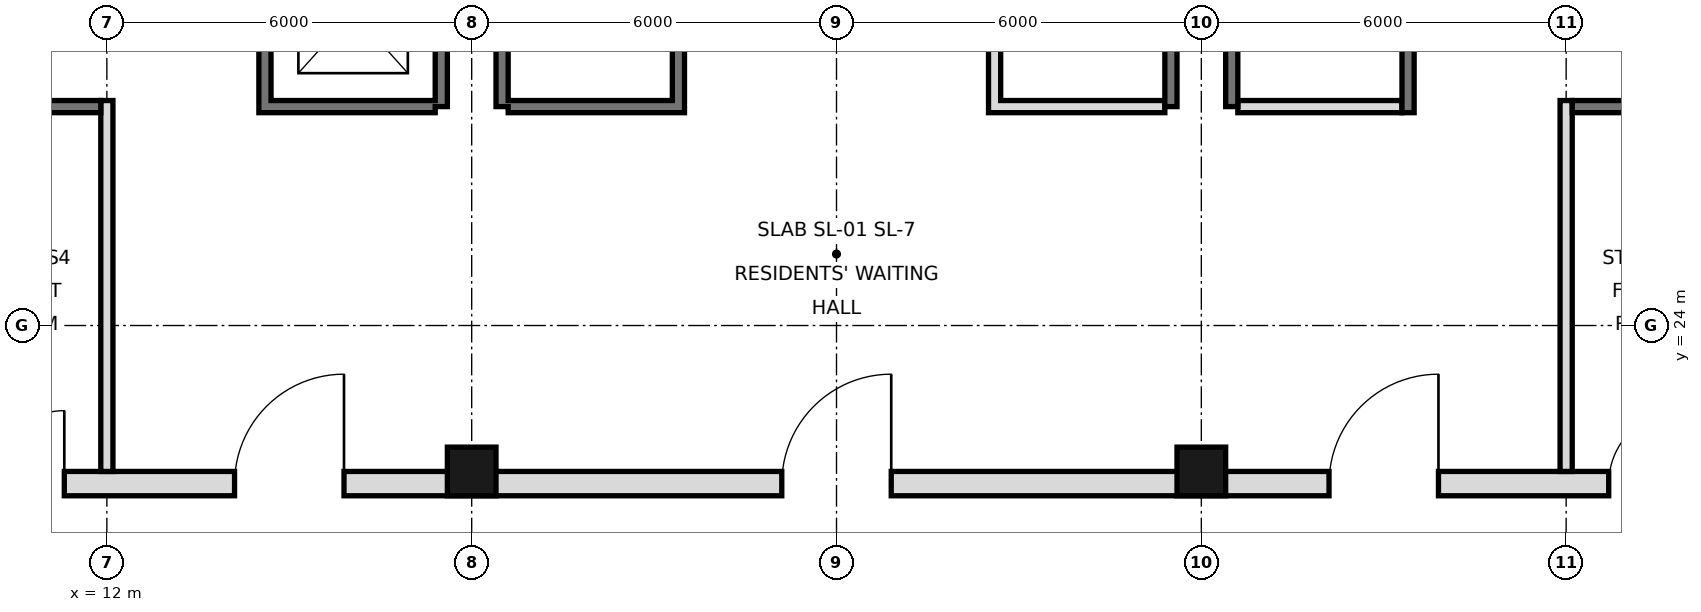
"""IFC4 building model, lengths in metres.
Left out: names, types, materials, properties, quantities, classifications, styles, units other than length and angle.
Written with IfcOpenShell. Run it as: python <this file> out.ifc"""

import sys

from ifc_helpers import new_model, si_unit, direction, frame, frame_2d, origin, origin_2d, place, context, subcontext, project, spatial, rectangle, hollow_rectangle, extrude, element, fill, save


model = new_model("IFC4")
c1 = context("Model", 3, precision=1e-05, world=origin(), true_north=direction((0.0, 1.0)))
c2 = subcontext(c1, "Body", "Model", "MODEL_VIEW")
j1 = project(units=[si_unit("LENGTHUNIT", "METRE"), si_unit("PLANEANGLEUNIT", "RADIAN")], contexts=[c1])
p1 = place(None, origin())
s1 = spatial("IfcSite", under=j1, at=p1, CompositionType="ELEMENT")
p2 = place(p1, origin())
s2 = spatial("IfcBuilding", under=s1, at=p2, CompositionType="ELEMENT")
p3 = place(p2, frame((0.0, 0.0, 49.8)))
s3 = spatial("IfcBuildingStorey", under=s2, at=p3, CompositionType="ELEMENT", Elevation=49.8)
for number, where, z_axis, x_axis in (
    (1, (18.0, 21.6, 0.0), (0.0, 0.0, 1.0), (1.0, 0.0, 0.0)),
    (2, (30.0, 21.6, 0.0), (0.0, 0.0, 1.0), (1.0, 0.0, 0.0)),
):
    element("IfcColumn", number, at=place(p3, frame(where, z_axis=z_axis, x_axis=x_axis)), inside=s3, PredefinedType="COLUMN", context=c2, shape_type="SweptSolid", body=[
        extrude(hollow_rectangle(XDim=0.8, YDim=0.8, WallThickness=0.06, at=origin_2d()), origin(), (0.0, 0.0, 1.0), 3.6),
    ])
for number, where, z_axis, x_axis in (
    (3, (17.5, 27.6, 0.0), (0.0, 0.0, 1.0), (0.0, 1.0, 0.0)),
    (4, (18.5, 27.6, 0.0), (0.0, 0.0, 1.0), (0.0, 1.0, 0.0)),
    (5, (29.5, 27.6, 0.0), (0.0, 0.0, 1.0), (0.0, 1.0, 0.0)),
    (6, (30.5, 27.6, 0.0), (0.0, 0.0, 1.0), (0.0, 1.0, 0.0)),
):
    element("IfcWall", number, at=place(p3, frame(where, z_axis=z_axis, x_axis=x_axis)), inside=s3, PredefinedType="SOLIDWALL", context=c2, shape_type="SweptSolid", body=[
        extrude(rectangle(XDim=17.5, YDim=0.2, at=frame_2d((8.75, 0.0))), origin(), (0.0, 0.0, 1.0), 3.42),
    ])
p4 = place(p3, frame((5.6, 21.4, 0.0), z_axis=(0.0, 0.0, 1.0), x_axis=(1.0, 0.0, 0.0)))
e7 = element("IfcWall", 7, at=p4, inside=s3, PredefinedType="SOLIDWALL", context=c2, shape_type="SweptSolid", body=[
    extrude(rectangle(XDim=36.8, YDim=0.4, at=frame_2d((18.4, 0.0))), origin(), (0.0, 0.0, 1.0), 3.42),
])
p5 = place(p4, frame((8.5, 0.0, 0.0)))
e8 = element("IfcOpeningElement", 8, at=p5, cuts=e7, PredefinedType="OPENING", context=c2, shape_type="SweptSolid", body=[
    extrude(rectangle(XDim=1.8, YDim=2.1, at=frame_2d((0.9, 1.05))), frame((0.0, 0.21, 0.0), z_axis=(0.0, -1.0, 0.0), x_axis=(1.0, 0.0, 0.0)), (0.0, 0.0, 1.0), 0.42),
])
p6 = place(p4, frame((17.5, 0.0, 0.0)))
e9 = element("IfcOpeningElement", 9, at=p6, cuts=e7, PredefinedType="OPENING", context=c2, shape_type="SweptSolid", body=[
    extrude(rectangle(XDim=1.8, YDim=2.1, at=frame_2d((0.9, 1.05))), frame((0.0, 0.21, 0.0), z_axis=(0.0, -1.0, 0.0), x_axis=(1.0, 0.0, 0.0)), (0.0, 0.0, 1.0), 0.42),
])
p7 = place(p4, frame((26.5, 0.0, 0.0)))
e10 = element("IfcOpeningElement", 10, at=p7, cuts=e7, PredefinedType="OPENING", context=c2, shape_type="SweptSolid", body=[
    extrude(rectangle(XDim=1.8, YDim=2.1, at=frame_2d((0.9, 1.05))), frame((0.0, 0.21, 0.0), z_axis=(0.0, -1.0, 0.0), x_axis=(1.0, 0.0, 0.0)), (0.0, 0.0, 1.0), 0.42),
])
p8 = place(p4, frame((4.5, 0.0, 0.0)))
e11 = element("IfcOpeningElement", 11, at=p8, cuts=e7, PredefinedType="OPENING", context=c2, shape_type="SweptSolid", body=[
    extrude(rectangle(XDim=1.2, YDim=2.1, at=frame_2d((0.6, 1.05))), frame((0.0, 0.21, 0.0), z_axis=(0.0, -1.0, 0.0), x_axis=(1.0, 0.0, 0.0)), (0.0, 0.0, 1.0), 0.42),
])
p9 = place(p4, frame((31.1, 0.0, 0.0)))
e12 = element("IfcOpeningElement", 12, at=p9, cuts=e7, PredefinedType="OPENING", context=c2, shape_type="SweptSolid", body=[
    extrude(rectangle(XDim=1.2, YDim=2.1, at=frame_2d((0.6, 1.05))), frame((0.0, 0.21, 0.0), z_axis=(0.0, -1.0, 0.0), x_axis=(1.0, 0.0, 0.0)), (0.0, 0.0, 1.0), 0.42),
])
p10 = place(p3, frame((12.0, 21.6, 0.0), z_axis=(0.0, 0.0, 1.0), x_axis=(0.0, 1.0, 0.0)))
e13 = element("IfcWall", 13, at=p10, inside=s3, PredefinedType="PARTITIONING", context=c2, shape_type="SweptSolid", body=[
    extrude(rectangle(XDim=6.1, YDim=0.2, at=frame_2d((3.05, 0.0))), origin(), (0.0, 0.0, 1.0), 3.42),
])
p11 = place(p3, frame((14.6, 27.5, 0.0), z_axis=(0.0, 0.0, 1.0), x_axis=(0.0, 1.0, 0.0)))
e14 = element("IfcWall", 14, at=p11, inside=s3, PredefinedType="SOLIDWALL", context=c2, shape_type="SweptSolid", body=[
    extrude(rectangle(XDim=17.5, YDim=0.2, at=frame_2d((8.75, 0.0))), origin(), (0.0, 0.0, 1.0), 3.42),
])
p12 = place(p11, frame((1.1, 0.0, 0.0)))
e15 = element("IfcOpeningElement", 15, at=p12, cuts=e14, PredefinedType="OPENING", context=c2, shape_type="SweptSolid", body=[
    extrude(rectangle(XDim=1.1, YDim=2.1, at=frame_2d((0.55, 1.05))), frame((0.0, 0.11, 0.0), z_axis=(0.0, -1.0, 0.0), x_axis=(1.0, 0.0, 0.0)), (0.0, 0.0, 1.0), 0.22),
])
p13 = place(p11, frame((4.2, 0.0, 0.0)))
e16 = element("IfcOpeningElement", 16, at=p13, cuts=e14, PredefinedType="OPENING", context=c2, shape_type="SweptSolid", body=[
    extrude(rectangle(XDim=1.1, YDim=2.1, at=frame_2d((0.55, 1.05))), frame((0.0, 0.11, 0.0), z_axis=(0.0, -1.0, 0.0), x_axis=(1.0, 0.0, 0.0)), (0.0, 0.0, 1.0), 0.22),
])
p14 = place(p11, frame((15.4, 0.0, 0.0)))
e17 = element("IfcOpeningElement", 17, at=p14, cuts=e14, PredefinedType="OPENING", context=c2, shape_type="SweptSolid", body=[
    extrude(rectangle(XDim=1.1, YDim=2.1, at=frame_2d((0.55, 1.05))), frame((0.0, 0.11, 0.0), z_axis=(0.0, -1.0, 0.0), x_axis=(1.0, 0.0, 0.0)), (0.0, 0.0, 1.0), 0.22),
])
p15 = place(p11, frame((9.9, 0.0, 0.0)))
e18 = element("IfcOpeningElement", 18, at=p15, cuts=e14, PredefinedType="OPENING", context=c2, shape_type="SweptSolid", body=[
    extrude(rectangle(XDim=0.9, YDim=2.1, at=frame_2d((0.45, 1.05))), frame((0.0, 0.11, 0.0), z_axis=(0.0, -1.0, 0.0), x_axis=(1.0, 0.0, 0.0)), (0.0, 0.0, 1.0), 0.22),
])
p16 = place(p3, frame((21.4, 27.5, 0.0), z_axis=(0.0, 0.0, 1.0), x_axis=(0.0, 1.0, 0.0)))
e19 = element("IfcWall", 19, at=p16, inside=s3, PredefinedType="SOLIDWALL", context=c2, shape_type="SweptSolid", body=[
    extrude(rectangle(XDim=17.5, YDim=0.2, at=frame_2d((8.75, 0.0))), origin(), (0.0, 0.0, 1.0), 3.42),
])
p17 = place(p16, frame((9.8, 0.0, 0.0)))
e20 = element("IfcOpeningElement", 20, at=p17, cuts=e19, PredefinedType="OPENING", context=c2, shape_type="SweptSolid", body=[
    extrude(rectangle(XDim=1.0, YDim=2.1, at=frame_2d((0.5, 1.05))), frame((0.0, 0.11, 0.0), z_axis=(0.0, -1.0, 0.0), x_axis=(1.0, 0.0, 0.0)), (0.0, 0.0, 1.0), 0.22),
])
p18 = place(p16, frame((7.4, 0.0, 0.0)))
e21 = element("IfcOpeningElement", 21, at=p18, cuts=e19, PredefinedType="OPENING", context=c2, shape_type="SweptSolid", body=[
    extrude(rectangle(XDim=0.9, YDim=2.1, at=frame_2d((0.45, 1.05))), frame((0.0, 0.11, 0.0), z_axis=(0.0, -1.0, 0.0), x_axis=(1.0, 0.0, 0.0)), (0.0, 0.0, 1.0), 0.22),
])
p19 = place(p3, frame((26.6, 27.5, 0.0), z_axis=(0.0, 0.0, 1.0), x_axis=(0.0, 1.0, 0.0)))
e22 = element("IfcWall", 22, at=p19, inside=s3, PredefinedType="SOLIDWALL", context=c2, shape_type="SweptSolid", body=[
    extrude(rectangle(XDim=17.5, YDim=0.2, at=frame_2d((8.75, 0.0))), origin(), (0.0, 0.0, 1.0), 3.42),
])
p20 = place(p19, frame((4.3, 0.0, 0.0)))
e23 = element("IfcOpeningElement", 23, at=p20, cuts=e22, PredefinedType="OPENING", context=c2, shape_type="SweptSolid", body=[
    extrude(rectangle(XDim=0.9, YDim=2.1, at=frame_2d((0.45, 1.05))), frame((0.0, 0.11, 0.0), z_axis=(0.0, -1.0, 0.0), x_axis=(1.0, 0.0, 0.0)), (0.0, 0.0, 1.0), 0.22),
])
p21 = place(p19, frame((10.35, 0.0, 0.0)))
e24 = element("IfcOpeningElement", 24, at=p21, cuts=e22, PredefinedType="OPENING", context=c2, shape_type="SweptSolid", body=[
    extrude(rectangle(XDim=1.0, YDim=2.1, at=frame_2d((0.5, 1.05))), frame((0.0, 0.11, 0.0), z_axis=(0.0, -1.0, 0.0), x_axis=(1.0, 0.0, 0.0)), (0.0, 0.0, 1.0), 0.22),
])
p22 = place(p19, frame((14.575, 0.0, 0.0)))
e25 = element("IfcOpeningElement", 25, at=p22, cuts=e22, PredefinedType="OPENING", context=c2, shape_type="SweptSolid", body=[
    extrude(rectangle(XDim=1.0, YDim=2.1, at=frame_2d((0.5, 1.05))), frame((0.0, 0.11, 0.0), z_axis=(0.0, -1.0, 0.0), x_axis=(1.0, 0.0, 0.0)), (0.0, 0.0, 1.0), 0.22),
])
p23 = place(p3, frame((33.4, 27.5, 0.0), z_axis=(0.0, 0.0, 1.0), x_axis=(0.0, 1.0, 0.0)))
e26 = element("IfcWall", 26, at=p23, inside=s3, PredefinedType="SOLIDWALL", context=c2, shape_type="SweptSolid", body=[
    extrude(rectangle(XDim=17.5, YDim=0.2, at=frame_2d((8.75, 0.0))), origin(), (0.0, 0.0, 1.0), 3.42),
])
p24 = place(p23, frame((15.4, 0.0, 0.0)))
e27 = element("IfcOpeningElement", 27, at=p24, cuts=e26, PredefinedType="OPENING", context=c2, shape_type="SweptSolid", body=[
    extrude(rectangle(XDim=1.1, YDim=2.1, at=frame_2d((0.55, 1.05))), frame((0.0, 0.11, 0.0), z_axis=(0.0, -1.0, 0.0), x_axis=(1.0, 0.0, 0.0)), (0.0, 0.0, 1.0), 0.22),
])
p25 = place(p23, frame((2.7, 0.0, 0.0)))
e28 = element("IfcOpeningElement", 28, at=p25, cuts=e26, PredefinedType="OPENING", context=c2, shape_type="SweptSolid", body=[
    extrude(rectangle(XDim=1.0, YDim=2.1, at=frame_2d((0.5, 1.05))), frame((0.0, 0.11, 0.0), z_axis=(0.0, -1.0, 0.0), x_axis=(1.0, 0.0, 0.0)), (0.0, 0.0, 1.0), 0.22),
])
p26 = place(p23, frame((9.9, 0.0, 0.0)))
e29 = element("IfcOpeningElement", 29, at=p26, cuts=e26, PredefinedType="OPENING", context=c2, shape_type="SweptSolid", body=[
    extrude(rectangle(XDim=0.9, YDim=2.1, at=frame_2d((0.45, 1.05))), frame((0.0, 0.11, 0.0), z_axis=(0.0, -1.0, 0.0), x_axis=(1.0, 0.0, 0.0)), (0.0, 0.0, 1.0), 0.22),
])
p27 = place(p3, frame((36.0, 21.6, 0.0), z_axis=(0.0, 0.0, 1.0), x_axis=(0.0, 1.0, 0.0)))
e30 = element("IfcWall", 30, at=p27, inside=s3, PredefinedType="PARTITIONING", context=c2, shape_type="SweptSolid", body=[
    extrude(rectangle(XDim=6.1, YDim=0.2, at=frame_2d((3.05, 0.0))), origin(), (0.0, 0.0, 1.0), 3.42),
])
for number, where, z_axis, x_axis in (
    (31, (14.7, 27.6, 0.0), (0.0, 0.0, 1.0), (1.0, 0.0, 0.0)),
    (32, (18.6, 27.6, 0.0), (0.0, 0.0, 1.0), (1.0, 0.0, 0.0)),
    (33, (26.7, 27.6, 0.0), (0.0, 0.0, 1.0), (1.0, 0.0, 0.0)),
):
    element("IfcWall", number, at=place(p3, frame(where, z_axis=z_axis, x_axis=x_axis)), inside=s3, PredefinedType="SOLIDWALL", context=c2, shape_type="SweptSolid", body=[
        extrude(rectangle(XDim=2.7, YDim=0.2, at=frame_2d((1.35, 0.0))), origin(), (0.0, 0.0, 1.0), 3.42),
    ])
p28 = place(p3, frame((30.6, 27.6, 0.0), z_axis=(0.0, 0.0, 1.0), x_axis=(1.0, 0.0, 0.0)))
e34 = element("IfcWall", 34, at=p28, inside=s3, PredefinedType="PARTITIONING", context=c2, shape_type="SweptSolid", body=[
    extrude(rectangle(XDim=2.7, YDim=0.2, at=frame_2d((1.35, 0.0))), origin(), (0.0, 0.0, 1.0), 3.42),
])
for number, where, z_axis, x_axis in (
    (35, (36.1, 27.6, 0.0), (0.0, 0.0, 1.0), (1.0, 0.0, 0.0)),
    (36, (6.6, 27.6, 0.0), (0.0, 0.0, 1.0), (1.0, 0.0, 0.0)),
):
    element("IfcWall", number, at=place(p3, frame(where, z_axis=z_axis, x_axis=x_axis)), inside=s3, PredefinedType="SOLIDWALL", context=c2, shape_type="SweptSolid", body=[
        extrude(rectangle(XDim=5.3, YDim=0.2, at=frame_2d((2.65, 0.0))), origin(), (0.0, 0.0, 1.0), 3.42),
    ])
p29 = place(p5, frame((1.8, 0.0, 0.0), z_axis=(0.0, 0.0, 1.0), x_axis=(-1.0, 0.0, 0.0)))
e37 = element("IfcDoor", 37, at=p29, inside=s3, OperationType="SINGLE_SWING_LEFT", PredefinedType="DOOR", context=c2, shape_type="SweptSolid", body=[
    extrude(rectangle(XDim=1.8, YDim=2.1, at=frame_2d((0.9, 1.05))), frame((0.0, 0.025, 0.0), z_axis=(0.0, -1.0, 0.0), x_axis=(1.0, 0.0, 0.0)), (0.0, 0.0, 1.0), 0.05),
])
fill(e8, e37)
p30 = place(p6, frame((1.8, 0.0, 0.0), z_axis=(0.0, 0.0, 1.0), x_axis=(-1.0, 0.0, 0.0)))
e38 = element("IfcDoor", 38, at=p30, inside=s3, OperationType="SINGLE_SWING_LEFT", PredefinedType="DOOR", context=c2, shape_type="SweptSolid", body=[
    extrude(rectangle(XDim=1.8, YDim=2.1, at=frame_2d((0.9, 1.05))), frame((0.0, 0.025, 0.0), z_axis=(0.0, -1.0, 0.0), x_axis=(1.0, 0.0, 0.0)), (0.0, 0.0, 1.0), 0.05),
])
fill(e9, e38)
p31 = place(p7, frame((1.8, 0.0, 0.0), z_axis=(0.0, 0.0, 1.0), x_axis=(-1.0, 0.0, 0.0)))
e39 = element("IfcDoor", 39, at=p31, inside=s3, OperationType="SINGLE_SWING_LEFT", PredefinedType="DOOR", context=c2, shape_type="SweptSolid", body=[
    extrude(rectangle(XDim=1.8, YDim=2.1, at=frame_2d((0.9, 1.05))), frame((0.0, 0.025, 0.0), z_axis=(0.0, -1.0, 0.0), x_axis=(1.0, 0.0, 0.0)), (0.0, 0.0, 1.0), 0.05),
])
fill(e10, e39)
p32 = place(p8, frame((1.2, 0.0, 0.0), z_axis=(0.0, 0.0, 1.0), x_axis=(-1.0, 0.0, 0.0)))
e40 = element("IfcDoor", 40, at=p32, inside=s3, OperationType="SINGLE_SWING_LEFT", PredefinedType="DOOR", context=c2, shape_type="SweptSolid", body=[
    extrude(rectangle(XDim=1.2, YDim=2.1, at=frame_2d((0.6, 1.05))), frame((0.0, 0.025, 0.0), z_axis=(0.0, -1.0, 0.0), x_axis=(1.0, 0.0, 0.0)), (0.0, 0.0, 1.0), 0.05),
])
fill(e11, e40)
p33 = place(p9, frame((1.2, 0.0, 0.0), z_axis=(0.0, 0.0, 1.0), x_axis=(-1.0, 0.0, 0.0)))
e41 = element("IfcDoor", 41, at=p33, inside=s3, OperationType="SINGLE_SWING_LEFT", PredefinedType="DOOR", context=c2, shape_type="SweptSolid", body=[
    extrude(rectangle(XDim=1.2, YDim=2.1, at=frame_2d((0.6, 1.05))), frame((0.0, 0.025, 0.0), z_axis=(0.0, -1.0, 0.0), x_axis=(1.0, 0.0, 0.0)), (0.0, 0.0, 1.0), 0.05),
])
fill(e12, e41)
save(model, sys.argv[1])
